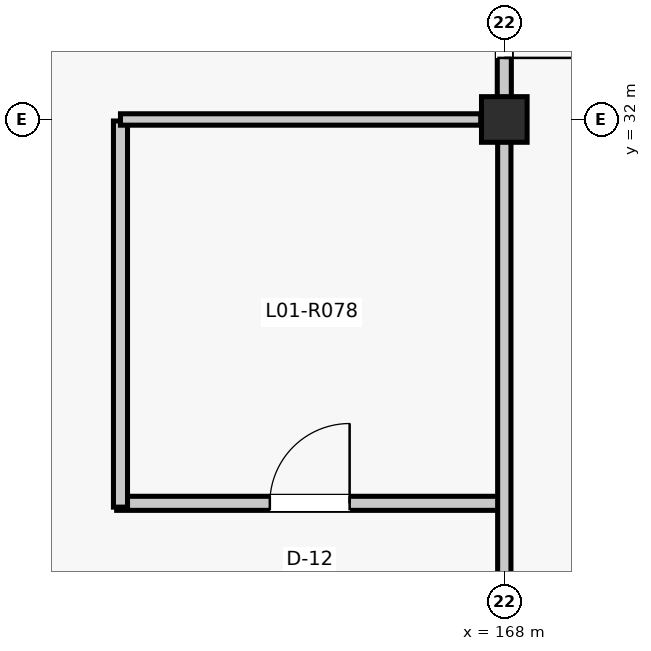
"""IFC4 building model, lengths in metres.
Left out: names, types, materials, properties, quantities, classifications, styles, units other than length and angle.
Written with IfcOpenShell. Run it as: python <this file> out.ifc"""

import sys

from ifc_helpers import new_model, si_unit, direction, frame, frame_2d, origin, origin_2d, place, context, subcontext, project, spatial, rectangle, extrude, element, fill, save


model = new_model("IFC4")
c1 = context("Model", 3, precision=1e-05, world=origin(), true_north=direction((0.0, 1.0)))
c2 = subcontext(c1, "Body", "Model", "MODEL_VIEW")
j1 = project(units=[si_unit("LENGTHUNIT", "METRE"), si_unit("PLANEANGLEUNIT", "RADIAN")], contexts=[c1])
p1 = place(None, origin())
s1 = spatial("IfcSite", under=j1, at=p1, CompositionType="ELEMENT")
p2 = place(p1, origin())
s2 = spatial("IfcBuilding", under=s1, at=p2, CompositionType="ELEMENT")
p3 = place(p2, frame((0.0, 0.0, 5.28)))
s3 = spatial("IfcBuildingStorey", under=s2, at=p3, CompositionType="ELEMENT", Elevation=5.28)
p4 = place(p3, frame((168.0, 32.0, 0.0), z_axis=(0.0, 0.0, 1.0), x_axis=(1.0, 0.0, 0.0)))
e1 = element("IfcColumn", 1, at=p4, inside=s3, PredefinedType="COLUMN", context=c2, shape_type="SweptSolid", body=[
    extrude(rectangle(XDim=0.6, YDim=0.6, at=origin_2d()), origin(), (0.0, 0.0, 1.0), 4.62),
])
p5 = place(p3, frame((162.9, 26.95, 0.0), z_axis=(0.0, 0.0, 1.0), x_axis=(1.0, 0.0, 0.0)))
e2 = element("IfcWall", 2, at=p5, inside=s3, PredefinedType="PARTITIONING", context=c2, shape_type="SweptSolid", body=[
    extrude(rectangle(XDim=5.08, YDim=0.185, at=frame_2d((2.54, 0.0))), origin(), (0.0, 0.0, 1.0), 3.787),
])
p6 = place(p5, frame((2.015, 0.0, 0.0)))
e3 = element("IfcOpeningElement", 3, at=p6, cuts=e2, PredefinedType="OPENING", context=c2, shape_type="SweptSolid", body=[
    extrude(rectangle(XDim=1.05, YDim=2.15, at=frame_2d((0.525, 1.075))), frame((0.0, 0.103, 0.0), z_axis=(0.0, -1.0, 0.0), x_axis=(1.0, 0.0, 0.0)), (0.0, 0.0, 1.0), 0.205),
])
p7 = place(p3, frame((162.95, 26.9, 0.0), z_axis=(0.0, 0.0, 1.0), x_axis=(0.0, 1.0, 0.0)))
e4 = element("IfcWall", 4, at=p7, inside=s3, PredefinedType="PARTITIONING", context=c2, shape_type="SweptSolid", body=[
    extrude(rectangle(XDim=5.08, YDim=0.185, at=frame_2d((2.54, 0.0))), origin(), (0.0, 0.0, 1.0), 3.712),
])
p8 = place(p3, frame((162.95, 32.0, 0.0), z_axis=(0.0, 0.0, 1.0), x_axis=(1.0, 0.0, 0.0)))
e5 = element("IfcWall", 5, at=p8, inside=s3, PredefinedType="PARTITIONING", context=c2, shape_type="SweptSolid", body=[
    extrude(rectangle(XDim=4.74, YDim=0.15, at=frame_2d((2.37, 0.0))), origin(), (0.0, 0.0, 1.0), 3.712),
])
p9 = place(p3, frame((168.0, 24.39, 0.0), z_axis=(0.0, 0.0, 1.0), x_axis=(0.0, 1.0, 0.0)))
e6 = element("IfcWall", 6, at=p9, inside=s3, PredefinedType="PARTITIONING", context=c2, shape_type="SweptSolid", body=[
    extrude(rectangle(XDim=7.32, YDim=0.175, at=frame_2d((3.66, 0.0))), origin(), (0.0, 0.0, 1.0), 3.787),
])
p10 = place(p9, frame((0.52, 0.0, 0.0)))
e7 = element("IfcOpeningElement", 7, at=p10, cuts=e6, PredefinedType="OPENING", context=c2, shape_type="SweptSolid", body=[
    extrude(rectangle(XDim=0.94, YDim=2.12, at=frame_2d((0.47, 1.06))), frame((0.0, 0.097, 0.0), z_axis=(0.0, -1.0, 0.0), x_axis=(1.0, 0.0, 0.0)), (0.0, 0.0, 1.0), 0.195),
])
p11 = place(p3, frame((168.0, 32.29, 0.0), z_axis=(0.0, 0.0, 1.0), x_axis=(0.0, 1.0, 0.0)))
e8 = element("IfcWall", 8, at=p11, inside=s3, PredefinedType="PARTITIONING", context=c2, shape_type="SweptSolid", body=[
    extrude(rectangle(XDim=7.42, YDim=0.185, at=frame_2d((3.71, 0.0))), origin(), (0.0, 0.0, 1.0), 3.857),
])
p12 = place(p11, frame((0.52, 0.0, 0.0)))
e9 = element("IfcOpeningElement", 9, at=p12, cuts=e8, PredefinedType="OPENING", context=c2, shape_type="SweptSolid", body=[
    extrude(rectangle(XDim=0.94, YDim=2.12, at=frame_2d((0.47, 1.06))), frame((0.0, 0.103, 0.0), z_axis=(0.0, -1.0, 0.0), x_axis=(1.0, 0.0, 0.0)), (0.0, 0.0, 1.0), 0.205),
])
p13 = place(p6, origin())
e10 = element("IfcDoor", 10, at=p13, inside=s3, OperationType="SINGLE_SWING_RIGHT", PredefinedType="DOOR", context=c2, shape_type="SweptSolid", body=[
    extrude(rectangle(XDim=1.05, YDim=2.15, at=frame_2d((0.525, 1.075))), frame((0.0, 0.025, 0.0), z_axis=(0.0, -1.0, 0.0), x_axis=(1.0, 0.0, 0.0)), (0.0, 0.0, 1.0), 0.05),
])
fill(e3, e10)
p14 = place(p12, frame((0.94, 0.0, 0.0), z_axis=(0.0, 0.0, 1.0), x_axis=(-1.0, 0.0, 0.0)))
e11 = element("IfcDoor", 11, at=p14, inside=s3, OperationType="SINGLE_SWING_LEFT", PredefinedType="DOOR", context=c2, shape_type="SweptSolid", body=[
    extrude(rectangle(XDim=0.94, YDim=2.12, at=frame_2d((0.47, 1.06))), frame((0.0, 0.025, 0.0), z_axis=(0.0, -1.0, 0.0), x_axis=(1.0, 0.0, 0.0)), (0.0, 0.0, 1.0), 0.05),
])
fill(e9, e11)
save(model, sys.argv[1])
